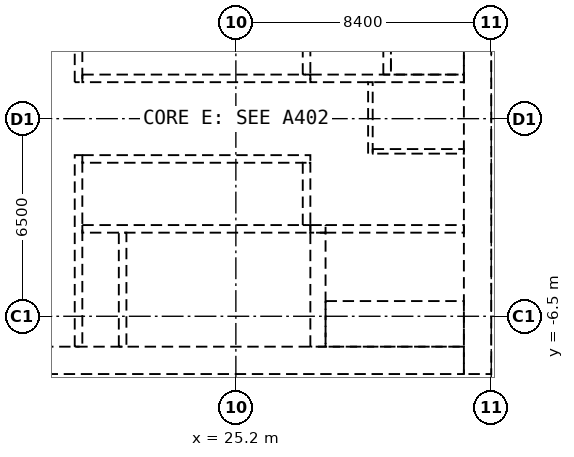
"""IFC4 building model, lengths in metres.
Left out: names, types, materials, properties, quantities, classifications, styles, units other than length and angle.
Written with IfcOpenShell. Run it as: python <this file> out.ifc"""

import sys

from ifc_helpers import new_model, si_unit, direction, frame, frame_2d, origin, place, context, subcontext, project, spatial, rectangle, extrude, element, fill, save


model = new_model("IFC4")
c1 = context("Model", 3, precision=1e-05, world=origin(), true_north=direction((0.0, 1.0)))
c2 = subcontext(c1, "Body", "Model", "MODEL_VIEW")
j1 = project(units=[si_unit("LENGTHUNIT", "METRE"), si_unit("PLANEANGLEUNIT", "RADIAN")], contexts=[c1])
p1 = place(None, origin())
s1 = spatial("IfcSite", under=j1, at=p1, CompositionType="ELEMENT")
p2 = place(p1, origin())
s2 = spatial("IfcBuilding", under=s1, at=p2, CompositionType="ELEMENT")
p3 = place(p2, frame((0.0, 0.0, 9.0)))
s3 = spatial("IfcBuildingStorey", under=s2, at=p3, CompositionType="ELEMENT", Elevation=9.0)
p4 = place(p3, frame((33.15, -8.4, 0.0), z_axis=(0.0, 0.0, 1.0), x_axis=(0.0, 1.0, 0.0)))
e1 = element("IfcWall", 1, at=p4, inside=s3, PredefinedType="SHEAR", context=c2, shape_type="SweptSolid", body=[
    extrude(rectangle(XDim=16.8, YDim=0.9, at=frame_2d((8.4, 0.0))), origin(), (0.0, 0.0, 1.0), 5.6),
])
p5 = place(p3, frame((17.7, -7.95, 0.0), z_axis=(0.0, 0.0, 1.0), x_axis=(1.0, 0.0, 0.0)))
e2 = element("IfcWall", 2, at=p5, inside=s3, PredefinedType="SHEAR", context=c2, shape_type="SweptSolid", body=[
    extrude(rectangle(XDim=15.0, YDim=0.9, at=frame_2d((7.5, 0.0))), origin(), (0.0, 0.0, 1.0), 5.6),
])
p6 = place(p5, frame((2.55, 0.0, 0.0)))
e3 = element("IfcOpeningElement", 3, at=p6, cuts=e2, PredefinedType="OPENING", context=c2, shape_type="SweptSolid", body=[
    extrude(rectangle(XDim=1.0, YDim=2.1, at=frame_2d((0.5, 1.05))), frame((0.0, 0.46, 0.0), z_axis=(0.0, -1.0, 0.0), x_axis=(1.0, 0.0, 0.0)), (0.0, 0.0, 1.0), 0.92),
])
p7 = place(p3, frame((20.025, 1.2, 0.0), z_axis=(0.0, 0.0, 1.0), x_axis=(0.0, 1.0, 0.0)))
e4 = element("IfcWall", 4, at=p7, inside=s3, PredefinedType="SHEAR", context=c2, shape_type="SweptSolid", body=[
    extrude(rectangle(XDim=6.3, YDim=0.25, at=frame_2d((3.15, 0.0))), origin(), (0.0, 0.0, 1.0), 5.6),
])
p8 = place(p3, frame((20.025, -7.5, 0.0), z_axis=(0.0, 0.0, 1.0), x_axis=(0.0, 1.0, 0.0)))
e5 = element("IfcWall", 5, at=p8, inside=s3, PredefinedType="SHEAR", context=c2, shape_type="SweptSolid", body=[
    extrude(rectangle(XDim=6.3, YDim=0.25, at=frame_2d((3.15, 0.0))), origin(), (0.0, 0.0, 1.0), 5.6),
])
p9 = place(p8, frame((2.4, 0.0, 0.0)))
e6 = element("IfcOpeningElement", 6, at=p9, cuts=e5, PredefinedType="OPENING", context=c2, shape_type="SweptSolid", body=[
    extrude(rectangle(XDim=1.0, YDim=2.1, at=frame_2d((0.5, 1.05))), frame((0.0, 0.135, 0.0), z_axis=(0.0, -1.0, 0.0), x_axis=(1.0, 0.0, 0.0)), (0.0, 0.0, 1.0), 0.27),
])
p10 = place(p3, frame((20.15, 1.325, 0.0), z_axis=(0.0, 0.0, 1.0), x_axis=(1.0, 0.0, 0.0)))
e7 = element("IfcWall", 7, at=p10, inside=s3, PredefinedType="SHEAR", context=c2, shape_type="SweptSolid", body=[
    extrude(rectangle(XDim=7.5, YDim=0.25, at=frame_2d((3.75, 0.0))), origin(), (0.0, 0.0, 1.0), 5.6),
])
p11 = place(p10, frame((0.65, 0.0, 0.0)))
e8 = element("IfcOpeningElement", 8, at=p11, cuts=e7, PredefinedType="OPENING", context=c2, shape_type="SweptSolid", body=[
    extrude(rectangle(XDim=1.1, YDim=2.1, at=frame_2d((0.55, 1.05))), frame((0.0, 0.135, 0.0), z_axis=(0.0, -1.0, 0.0), x_axis=(1.0, 0.0, 0.0)), (0.0, 0.0, 1.0), 0.27),
])
p12 = place(p10, frame((3.05, 0.0, 0.0)))
e9 = element("IfcOpeningElement", 9, at=p12, cuts=e7, PredefinedType="OPENING", context=c2, shape_type="SweptSolid", body=[
    extrude(rectangle(XDim=1.1, YDim=2.1, at=frame_2d((0.55, 1.05))), frame((0.0, 0.135, 0.0), z_axis=(0.0, -1.0, 0.0), x_axis=(1.0, 0.0, 0.0)), (0.0, 0.0, 1.0), 0.27),
])
p13 = place(p10, frame((5.45, 0.0, 0.0)))
e10 = element("IfcOpeningElement", 10, at=p13, cuts=e7, PredefinedType="OPENING", context=c2, shape_type="SweptSolid", body=[
    extrude(rectangle(XDim=1.1, YDim=2.1, at=frame_2d((0.55, 1.05))), frame((0.0, 0.135, 0.0), z_axis=(0.0, -1.0, 0.0), x_axis=(1.0, 0.0, 0.0)), (0.0, 0.0, 1.0), 0.27),
])
p14 = place(p3, frame((27.525, 1.45, 0.0), z_axis=(0.0, 0.0, 1.0), x_axis=(0.0, 1.0, 0.0)))
e11 = element("IfcWall", 11, at=p14, inside=s3, PredefinedType="SHEAR", context=c2, shape_type="SweptSolid", body=[
    extrude(rectangle(XDim=2.05, YDim=0.25, at=frame_2d((1.025, 0.0))), origin(), (0.0, 0.0, 1.0), 5.6),
])
p15 = place(p3, frame((27.65, 1.325, 0.0), z_axis=(0.0, 0.0, 1.0), x_axis=(1.0, 0.0, 0.0)))
e12 = element("IfcWall", 12, at=p15, inside=s3, PredefinedType="SHEAR", context=c2, shape_type="SweptSolid", body=[
    extrude(rectangle(XDim=5.05, YDim=0.25, at=frame_2d((2.525, 0.0))), origin(), (0.0, 0.0, 1.0), 5.6),
])
p16 = place(p15, frame((0.55, 0.0, 0.0)))
e13 = element("IfcOpeningElement", 13, at=p16, cuts=e12, PredefinedType="OPENING", context=c2, shape_type="SweptSolid", body=[
    extrude(rectangle(XDim=1.2, YDim=2.1, at=frame_2d((0.6, 1.05))), frame((0.0, 0.135, 0.0), z_axis=(0.0, -1.0, 0.0), x_axis=(1.0, 0.0, 0.0)), (0.0, 0.0, 1.0), 0.27),
])
p17 = place(p3, frame((30.175, 1.45, 0.0), z_axis=(0.0, 0.0, 1.0), x_axis=(0.0, 1.0, 0.0)))
e14 = element("IfcWall", 14, at=p17, inside=s3, PredefinedType="SHEAR", context=c2, shape_type="SweptSolid", body=[
    extrude(rectangle(XDim=6.05, YDim=0.25, at=frame_2d((3.025, 0.0))), origin(), (0.0, 0.0, 1.0), 5.6),
])
p18 = place(p17, frame((2.625, 0.0, 0.0)))
e15 = element("IfcOpeningElement", 15, at=p18, cuts=e14, PredefinedType="OPENING", context=c2, shape_type="SweptSolid", body=[
    extrude(rectangle(XDim=1.1, YDim=2.1, at=frame_2d((0.55, 1.05))), frame((0.0, 0.135, 0.0), z_axis=(0.0, -1.0, 0.0), x_axis=(1.0, 0.0, 0.0)), (0.0, 0.0, 1.0), 0.27),
])
p19 = place(p3, frame((30.3, 2.375, 0.0), z_axis=(0.0, 0.0, 1.0), x_axis=(1.0, 0.0, 0.0)))
e16 = element("IfcWall", 16, at=p19, inside=s3, PredefinedType="SHEAR", context=c2, shape_type="SweptSolid", body=[
    extrude(rectangle(XDim=2.4, YDim=1.85, at=frame_2d((1.2, 0.0))), origin(), (0.0, 0.0, 1.0), 5.6),
])
p20 = place(p3, frame((20.15, -1.325, 0.0), z_axis=(0.0, 0.0, 1.0), x_axis=(1.0, 0.0, 0.0)))
e17 = element("IfcWall", 17, at=p20, inside=s3, PredefinedType="SHEAR", context=c2, shape_type="SweptSolid", body=[
    extrude(rectangle(XDim=7.5, YDim=0.25, at=frame_2d((3.75, 0.0))), origin(), (0.0, 0.0, 1.0), 5.6),
])
p21 = place(p3, frame((27.525, -3.5, 0.0), z_axis=(0.0, 0.0, 1.0), x_axis=(0.0, 1.0, 0.0)))
e18 = element("IfcWall", 18, at=p21, inside=s3, PredefinedType="SHEAR", context=c2, shape_type="SweptSolid", body=[
    extrude(rectangle(XDim=2.05, YDim=0.25, at=frame_2d((1.025, 0.0))), origin(), (0.0, 0.0, 1.0), 5.6),
])
p22 = place(p3, frame((20.15, -3.625, 0.0), z_axis=(0.0, 0.0, 1.0), x_axis=(1.0, 0.0, 0.0)))
e19 = element("IfcWall", 19, at=p22, inside=s3, PredefinedType="SHEAR", context=c2, shape_type="SweptSolid", body=[
    extrude(rectangle(XDim=7.5, YDim=0.25, at=frame_2d((3.75, 0.0))), origin(), (0.0, 0.0, 1.0), 5.6),
])
p23 = place(p3, frame((21.475, -7.5, 0.0), z_axis=(0.0, 0.0, 1.0), x_axis=(0.0, 1.0, 0.0)))
e20 = element("IfcWall", 20, at=p23, inside=s3, PredefinedType="SHEAR", context=c2, shape_type="SweptSolid", body=[
    extrude(rectangle(XDim=3.75, YDim=0.25, at=frame_2d((1.875, 0.0))), origin(), (0.0, 0.0, 1.0), 5.6),
])
p24 = place(p23, frame((1.3, 0.0, 0.0)))
e21 = element("IfcOpeningElement", 21, at=p24, cuts=e20, PredefinedType="OPENING", context=c2, shape_type="SweptSolid", body=[
    extrude(rectangle(XDim=1.2, YDim=2.1, at=frame_2d((0.6, 1.05))), frame((0.0, 0.135, 0.0), z_axis=(0.0, -1.0, 0.0), x_axis=(1.0, 0.0, 0.0)), (0.0, 0.0, 1.0), 0.27),
])
p25 = place(p3, frame((27.9, -7.5, 0.0), z_axis=(0.0, 0.0, 1.0), x_axis=(0.0, 1.0, 0.0)))
e22 = element("IfcWall", 22, at=p25, inside=s3, PredefinedType="SHEAR", context=c2, shape_type="SweptSolid", body=[
    extrude(rectangle(XDim=3.75, YDim=0.5, at=frame_2d((1.875, 0.0))), origin(), (0.0, 0.0, 1.0), 5.6),
])
p26 = place(p3, frame((28.15, -3.625, 0.0), z_axis=(0.0, 0.0, 1.0), x_axis=(1.0, 0.0, 0.0)))
e23 = element("IfcWall", 23, at=p26, inside=s3, PredefinedType="SHEAR", context=c2, shape_type="SweptSolid", body=[
    extrude(rectangle(XDim=4.55, YDim=0.25, at=frame_2d((2.275, 0.0))), origin(), (0.0, 0.0, 1.0), 5.6),
])
p27 = place(p3, frame((28.15, -6.75, 0.0), z_axis=(0.0, 0.0, 1.0), x_axis=(1.0, 0.0, 0.0)))
e24 = element("IfcWall", 24, at=p27, inside=s3, PredefinedType="SHEAR", context=c2, shape_type="SweptSolid", body=[
    extrude(rectangle(XDim=4.55, YDim=1.5, at=frame_2d((2.275, 0.0))), origin(), (0.0, 0.0, 1.0), 5.6),
])
p28 = place(p3, frame((27.65, -3.625, 0.0), z_axis=(0.0, 0.0, 1.0), x_axis=(1.0, 0.0, 0.0)))
e25 = element("IfcWall", 25, at=p28, inside=s3, PredefinedType="SHEAR", context=c2, shape_type="SweptSolid", body=[
    extrude(rectangle(XDim=0.5, YDim=0.25, at=frame_2d((0.25, 0.0))), origin(), (0.0, 0.0, 1.0), 5.6),
])
p29 = place(p3, frame((29.625, -1.15, 0.0), z_axis=(0.0, 0.0, 1.0), x_axis=(0.0, 1.0, 0.0)))
e26 = element("IfcWall", 26, at=p29, inside=s3, PredefinedType="PARTITIONING", context=c2, shape_type="SweptSolid", body=[
    extrude(rectangle(XDim=2.35, YDim=0.15, at=frame_2d((1.175, 0.0))), origin(), (0.0, 0.0, 1.0), 5.6),
])
p30 = place(p29, frame((0.8, 0.0, 0.0)))
e27 = element("IfcOpeningElement", 27, at=p30, cuts=e26, PredefinedType="OPENING", context=c2, shape_type="SweptSolid", body=[
    extrude(rectangle(XDim=0.9, YDim=2.1, at=frame_2d((0.45, 1.05))), frame((0.0, 0.085, 0.0), z_axis=(0.0, -1.0, 0.0), x_axis=(1.0, 0.0, 0.0)), (0.0, 0.0, 1.0), 0.17),
])
p31 = place(p3, frame((29.7, -1.075, 0.0), z_axis=(0.0, 0.0, 1.0), x_axis=(1.0, 0.0, 0.0)))
e28 = element("IfcWall", 28, at=p31, inside=s3, PredefinedType="PARTITIONING", context=c2, shape_type="SweptSolid", body=[
    extrude(rectangle(XDim=3.0, YDim=0.15, at=frame_2d((1.5, 0.0))), origin(), (0.0, 0.0, 1.0), 5.6),
])
p32 = place(p6, origin())
e29 = element("IfcDoor", 29, at=p32, inside=s3, OperationType="SINGLE_SWING_RIGHT", PredefinedType="DOOR", context=c2, shape_type="SweptSolid", body=[
    extrude(rectangle(XDim=1.0, YDim=2.1, at=frame_2d((0.5, 1.05))), frame((0.0, 0.025, 0.0), z_axis=(0.0, -1.0, 0.0), x_axis=(1.0, 0.0, 0.0)), (0.0, 0.0, 1.0), 0.05),
])
fill(e3, e29)
p33 = place(p24, origin())
e30 = element("IfcDoor", 30, at=p33, inside=s3, OperationType="DOUBLE_DOOR_SINGLE_SWING", PredefinedType="DOOR", context=c2, shape_type="SweptSolid", body=[
    extrude(rectangle(XDim=1.2, YDim=2.1, at=frame_2d((0.6, 1.05))), frame((0.0, 0.025, 0.0), z_axis=(0.0, -1.0, 0.0), x_axis=(1.0, 0.0, 0.0)), (0.0, 0.0, 1.0), 0.05),
])
fill(e21, e30)
p34 = place(p9, origin())
e31 = element("IfcDoor", 31, at=p34, inside=s3, OperationType="SINGLE_SWING_RIGHT", PredefinedType="DOOR", context=c2, shape_type="SweptSolid", body=[
    extrude(rectangle(XDim=1.0, YDim=2.1, at=frame_2d((0.5, 1.05))), frame((0.0, 0.025, 0.0), z_axis=(0.0, -1.0, 0.0), x_axis=(1.0, 0.0, 0.0)), (0.0, 0.0, 1.0), 0.05),
])
fill(e6, e31)
p35 = place(p16, origin())
e32 = element("IfcDoor", 32, at=p35, inside=s3, OperationType="DOUBLE_DOOR_SINGLE_SWING", PredefinedType="DOOR", context=c2, shape_type="SweptSolid", body=[
    extrude(rectangle(XDim=1.2, YDim=2.1, at=frame_2d((0.6, 1.05))), frame((0.0, 0.025, 0.0), z_axis=(0.0, -1.0, 0.0), x_axis=(1.0, 0.0, 0.0)), (0.0, 0.0, 1.0), 0.05),
])
fill(e13, e32)
p36 = place(p30, origin())
e33 = element("IfcDoor", 33, at=p36, inside=s3, OperationType="SINGLE_SWING_LEFT", PredefinedType="DOOR", context=c2, shape_type="SweptSolid", body=[
    extrude(rectangle(XDim=0.9, YDim=2.1, at=frame_2d((0.45, 1.05))), frame((0.0, 0.025, 0.0), z_axis=(0.0, -1.0, 0.0), x_axis=(1.0, 0.0, 0.0)), (0.0, 0.0, 1.0), 0.05),
])
fill(e27, e33)
p37 = place(p11, origin())
e34 = element("IfcDoor", 34, at=p37, inside=s3, OperationType="DOUBLE_DOOR_SLIDING", PredefinedType="DOOR", context=c2, shape_type="SweptSolid", body=[
    extrude(rectangle(XDim=1.1, YDim=2.1, at=frame_2d((0.55, 1.05))), frame((0.0, 0.025, 0.0), z_axis=(0.0, -1.0, 0.0), x_axis=(1.0, 0.0, 0.0)), (0.0, 0.0, 1.0), 0.05),
])
fill(e8, e34)
p38 = place(p12, origin())
e35 = element("IfcDoor", 35, at=p38, inside=s3, OperationType="DOUBLE_DOOR_SLIDING", PredefinedType="DOOR", context=c2, shape_type="SweptSolid", body=[
    extrude(rectangle(XDim=1.1, YDim=2.1, at=frame_2d((0.55, 1.05))), frame((0.0, 0.025, 0.0), z_axis=(0.0, -1.0, 0.0), x_axis=(1.0, 0.0, 0.0)), (0.0, 0.0, 1.0), 0.05),
])
fill(e9, e35)
p39 = place(p13, origin())
e36 = element("IfcDoor", 36, at=p39, inside=s3, OperationType="DOUBLE_DOOR_SLIDING", PredefinedType="DOOR", context=c2, shape_type="SweptSolid", body=[
    extrude(rectangle(XDim=1.1, YDim=2.1, at=frame_2d((0.55, 1.05))), frame((0.0, 0.025, 0.0), z_axis=(0.0, -1.0, 0.0), x_axis=(1.0, 0.0, 0.0)), (0.0, 0.0, 1.0), 0.05),
])
fill(e10, e36)
save(model, sys.argv[1])
